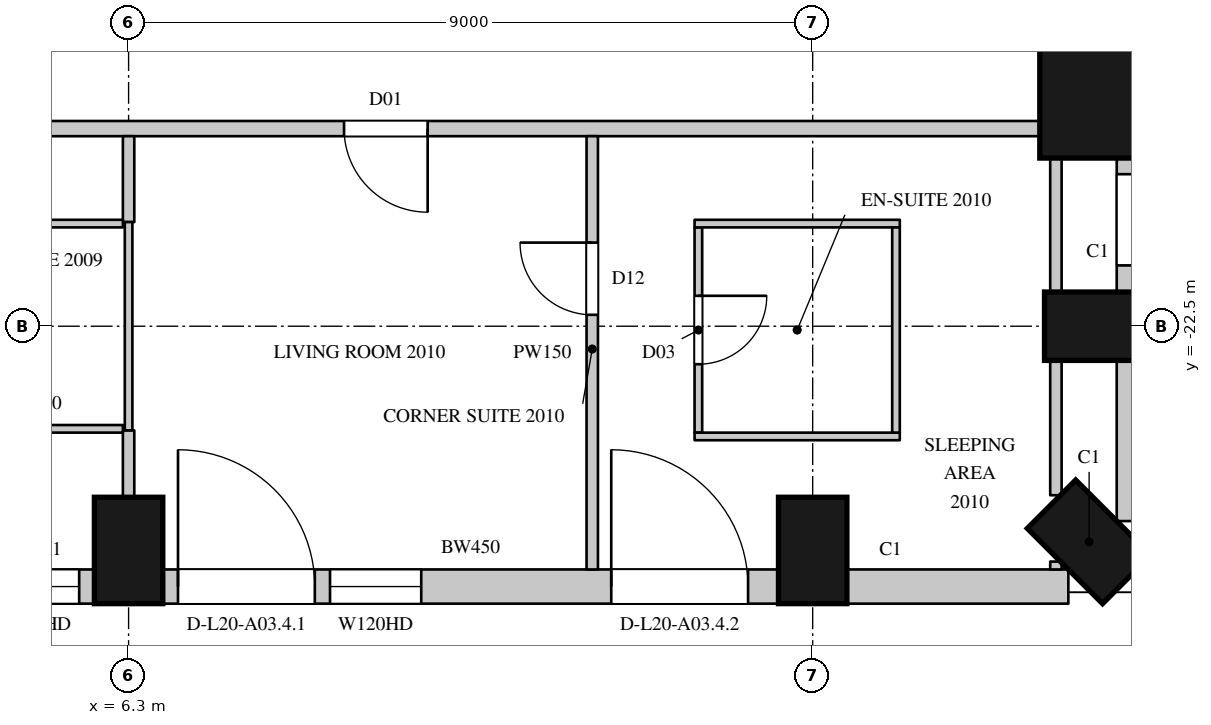
"""IFC4 building model, lengths in metres.
Left out: names, types, materials, properties, quantities, classifications, styles, units other than length and angle.
Written with IfcOpenShell. Run it as: python <this file> out.ifc"""

import sys

from ifc_helpers import new_model, si_unit, direction, frame, frame_2d, origin, origin_2d, place, context, subcontext, project, spatial, rectangle, circle, extrude, element, fill, save


model = new_model("IFC4")
c1 = context("Model", 3, precision=1e-05, world=origin(), true_north=direction((0.0, 1.0)))
c2 = subcontext(c1, "Body", "Model", "MODEL_VIEW")
j1 = project(units=[si_unit("LENGTHUNIT", "METRE"), si_unit("PLANEANGLEUNIT", "RADIAN")], contexts=[c1])
p1 = place(None, origin())
s1 = spatial("IfcSite", under=j1, at=p1, CompositionType="ELEMENT")
p2 = place(p1, origin())
s2 = spatial("IfcBuilding", under=s1, at=p2, CompositionType="ELEMENT")
p3 = place(p2, frame((0.0, 0.0, 102.3)))
s3 = spatial("IfcBuildingStorey", under=s2, at=p3, CompositionType="ELEMENT", Elevation=102.3)
for number, where, z_axis, x_axis in (
    (1, (6.3, -25.45, 0.0), (0.0, 0.0, 1.0), (1.0, 0.0, 0.0)),
    (2, (15.3, -25.45, 0.0), (0.0, 0.0, 1.0), (1.0, 0.0, 0.0)),
    (3, (18.937, -25.337, 0.0), (0.0, 0.0, 1.0), (0.707, 0.707, 0.0)),
    (4, (19.05, -22.5, 0.0), (0.0, 0.0, 1.0), (0.0, 1.0, 0.0)),
):
    element("IfcColumn", number, at=place(p3, frame(where, z_axis=z_axis, x_axis=x_axis)), inside=s3, PredefinedType="COLUMN", context=c2, shape_type="SweptSolid", body=[
        extrude(rectangle(XDim=0.9, YDim=1.4, at=origin_2d()), origin(), (0.0, 0.0, 1.0), 3.6),
    ])
p4 = place(p3, frame((19.088, -19.488, 0.0), z_axis=(0.0, 0.0, 1.0), x_axis=(1.0, 0.0, 0.0)))
e5 = element("IfcColumn", 5, at=p4, inside=s3, PredefinedType="COLUMN", context=c2, shape_type="SweptSolid", body=[
    extrude(circle(Radius=0.8, at=origin_2d()), origin(), (0.0, 0.0, 1.0), 3.6),
])
p5 = place(p3, frame((-2.25, -25.925, 0.0), z_axis=(0.0, 0.0, 1.0), x_axis=(1.0, 0.0, 0.0)))
e6 = element("IfcWall", 6, at=p5, inside=s3, PredefinedType="SOLIDWALL", context=c2, shape_type="SweptSolid", body=[
    extrude(rectangle(XDim=8.1, YDim=0.45, at=frame_2d((4.05, 0.0))), origin(), (0.0, 0.0, 1.0), 3.3),
])
p6 = place(p5, frame((0.2, 0.0, 0.0)))
e7 = element("IfcOpeningElement", 7, at=p6, cuts=e6, PredefinedType="OPENING", context=c2, shape_type="SweptSolid", body=[
    extrude(rectangle(XDim=1.8, YDim=2.4, at=frame_2d((0.9, 1.2))), frame((0.0, 0.235, 0.0), z_axis=(0.0, -1.0, 0.0), x_axis=(1.0, 0.0, 0.0)), (0.0, 0.0, 1.0), 0.47),
])
p7 = place(p5, frame((2.2, 0.0, 1.05)))
e8 = element("IfcOpeningElement", 8, at=p7, cuts=e6, PredefinedType="OPENING", context=c2, shape_type="SweptSolid", body=[
    extrude(rectangle(XDim=1.2, YDim=2.0, at=frame_2d((0.6, 1.0))), frame((0.0, 0.235, 0.0), z_axis=(0.0, -1.0, 0.0), x_axis=(1.0, 0.0, 0.0)), (0.0, 0.0, 1.0), 0.47),
])
p8 = place(p5, frame((4.7, 0.0, 0.0)))
e9 = element("IfcOpeningElement", 9, at=p8, cuts=e6, PredefinedType="OPENING", context=c2, shape_type="SweptSolid", body=[
    extrude(rectangle(XDim=1.8, YDim=2.4, at=frame_2d((0.9, 1.2))), frame((0.0, 0.235, 0.0), z_axis=(0.0, -1.0, 0.0), x_axis=(1.0, 0.0, 0.0)), (0.0, 0.0, 1.0), 0.47),
])
p9 = place(p5, frame((6.7, 0.0, 1.05)))
e10 = element("IfcOpeningElement", 10, at=p9, cuts=e6, PredefinedType="OPENING", context=c2, shape_type="SweptSolid", body=[
    extrude(rectangle(XDim=1.2, YDim=2.0, at=frame_2d((0.6, 1.0))), frame((0.0, 0.235, 0.0), z_axis=(0.0, -1.0, 0.0), x_axis=(1.0, 0.0, 0.0)), (0.0, 0.0, 1.0), 0.47),
])
p10 = place(p3, frame((6.75, -25.925, 0.0), z_axis=(0.0, 0.0, 1.0), x_axis=(1.0, 0.0, 0.0)))
e11 = element("IfcWall", 11, at=p10, inside=s3, PredefinedType="SOLIDWALL", context=c2, shape_type="SweptSolid", body=[
    extrude(rectangle(XDim=8.1, YDim=0.45, at=frame_2d((4.05, 0.0))), origin(), (0.0, 0.0, 1.0), 3.3),
])
p11 = place(p10, frame((0.2, 0.0, 0.0)))
e12 = element("IfcOpeningElement", 12, at=p11, cuts=e11, PredefinedType="OPENING", context=c2, shape_type="SweptSolid", body=[
    extrude(rectangle(XDim=1.8, YDim=2.4, at=frame_2d((0.9, 1.2))), frame((0.0, 0.235, 0.0), z_axis=(0.0, -1.0, 0.0), x_axis=(1.0, 0.0, 0.0)), (0.0, 0.0, 1.0), 0.47),
])
p12 = place(p10, frame((2.2, 0.0, 1.05)))
e13 = element("IfcOpeningElement", 13, at=p12, cuts=e11, PredefinedType="OPENING", context=c2, shape_type="SweptSolid", body=[
    extrude(rectangle(XDim=1.2, YDim=2.0, at=frame_2d((0.6, 1.0))), frame((0.0, 0.235, 0.0), z_axis=(0.0, -1.0, 0.0), x_axis=(1.0, 0.0, 0.0)), (0.0, 0.0, 1.0), 0.47),
])
p13 = place(p10, frame((5.9, 0.0, 0.0)))
e14 = element("IfcOpeningElement", 14, at=p13, cuts=e11, PredefinedType="OPENING", context=c2, shape_type="SweptSolid", body=[
    extrude(rectangle(XDim=1.8, YDim=2.4, at=frame_2d((0.9, 1.2))), frame((0.0, 0.235, 0.0), z_axis=(0.0, -1.0, 0.0), x_axis=(1.0, 0.0, 0.0)), (0.0, 0.0, 1.0), 0.47),
])
p14 = place(p3, frame((15.75, -25.925, 0.0), z_axis=(0.0, 0.0, 1.0), x_axis=(1.0, 0.0, 0.0)))
e15 = element("IfcWall", 15, at=p14, inside=s3, PredefinedType="SOLIDWALL", context=c2, shape_type="SweptSolid", body=[
    extrude(rectangle(XDim=2.914, YDim=0.45, at=frame_2d((1.457, 0.0))), origin(), (0.0, 0.0, 1.0), 3.3),
])
p15 = place(p3, frame((19.525, -25.064, 0.0), z_axis=(0.0, 0.0, 1.0), x_axis=(0.0, 1.0, 0.0)))
e16 = element("IfcWall", 16, at=p15, inside=s3, PredefinedType="SOLIDWALL", context=c2, shape_type="SweptSolid", body=[
    extrude(rectangle(XDim=2.114, YDim=0.45, at=frame_2d((1.057, 0.0))), origin(), (0.0, 0.0, 1.0), 3.3),
])
p16 = place(p3, frame((19.525, -22.05, 0.0), z_axis=(0.0, 0.0, 1.0), x_axis=(0.0, 1.0, 0.0)))
e17 = element("IfcWall", 17, at=p16, inside=s3, PredefinedType="SOLIDWALL", context=c2, shape_type="SweptSolid", body=[
    extrude(rectangle(XDim=1.792, YDim=0.45, at=frame_2d((0.896, 0.0))), origin(), (0.0, 0.0, 1.0), 3.3),
])
p17 = place(p16, frame((0.35, 0.0, 1.05)))
e18 = element("IfcOpeningElement", 18, at=p17, cuts=e17, PredefinedType="OPENING", context=c2, shape_type="SweptSolid", body=[
    extrude(rectangle(XDim=1.2, YDim=2.0, at=frame_2d((0.6, 1.0))), frame((0.0, 0.235, 0.0), z_axis=(0.0, -1.0, 0.0), x_axis=(1.0, 0.0, 0.0)), (0.0, 0.0, 1.0), 0.47),
])
p18 = place(p3, frame((-23.765, -19.9, 0.0), z_axis=(0.0, 0.0, 1.0), x_axis=(1.0, 0.0, 0.0)))
e19 = element("IfcWall", 19, at=p18, inside=s3, PredefinedType="PARTITIONING", context=c2, shape_type="SweptSolid", body=[
    extrude(rectangle(XDim=42.125, YDim=0.2, at=frame_2d((21.063, 0.0))), origin(), (0.0, 0.0, 1.0), 3.3),
])
p19 = place(p18, frame((6.2, 0.0, 0.0)))
e20 = element("IfcOpeningElement", 20, at=p19, cuts=e19, PredefinedType="OPENING", context=c2, shape_type="SweptSolid", body=[
    extrude(rectangle(XDim=0.95, YDim=2.2, at=frame_2d((0.475, 1.1))), frame((0.0, 0.11, 0.0), z_axis=(0.0, -1.0, 0.0), x_axis=(1.0, 0.0, 0.0)), (0.0, 0.0, 1.0), 0.22),
])
p20 = place(p18, frame((14.1, 0.0, 0.0)))
e21 = element("IfcOpeningElement", 21, at=p20, cuts=e19, PredefinedType="OPENING", context=c2, shape_type="SweptSolid", body=[
    extrude(rectangle(XDim=1.1, YDim=2.4, at=frame_2d((0.55, 1.2))), frame((0.0, 0.11, 0.0), z_axis=(0.0, -1.0, 0.0), x_axis=(1.0, 0.0, 0.0)), (0.0, 0.0, 1.0), 0.22),
])
p21 = place(p18, frame((24.2, 0.0, 0.0)))
e22 = element("IfcOpeningElement", 22, at=p21, cuts=e19, PredefinedType="OPENING", context=c2, shape_type="SweptSolid", body=[
    extrude(rectangle(XDim=0.95, YDim=2.2, at=frame_2d((0.475, 1.1))), frame((0.0, 0.11, 0.0), z_axis=(0.0, -1.0, 0.0), x_axis=(1.0, 0.0, 0.0)), (0.0, 0.0, 1.0), 0.22),
])
p22 = place(p18, frame((32.9, 0.0, 0.0)))
e23 = element("IfcOpeningElement", 23, at=p22, cuts=e19, PredefinedType="OPENING", context=c2, shape_type="SweptSolid", body=[
    extrude(rectangle(XDim=1.1, YDim=2.4, at=frame_2d((0.55, 1.2))), frame((0.0, 0.11, 0.0), z_axis=(0.0, -1.0, 0.0), x_axis=(1.0, 0.0, 0.0)), (0.0, 0.0, 1.0), 0.22),
])
p23 = place(p3, frame((6.3, -24.75, 0.0), z_axis=(0.0, 0.0, 1.0), x_axis=(0.0, 1.0, 0.0)))
e24 = element("IfcWall", 24, at=p23, inside=s3, PredefinedType="PARTITIONING", context=c2, shape_type="SweptSolid", body=[
    extrude(rectangle(XDim=0.88, YDim=0.15, at=frame_2d((0.44, 0.0))), origin(), (0.0, 0.0, 1.0), 2.75),
])
p24 = place(p3, frame((6.3, -21.13, 0.0), z_axis=(0.0, 0.0, 1.0), x_axis=(0.0, 1.0, 0.0)))
e25 = element("IfcWall", 25, at=p24, inside=s3, PredefinedType="PARTITIONING", context=c2, shape_type="SweptSolid", body=[
    extrude(rectangle(XDim=1.13, YDim=0.15, at=frame_2d((0.565, 0.0))), origin(), (0.0, 0.0, 1.0), 2.75),
])
p25 = place(p3, frame((12.4, -25.7, 0.0), z_axis=(0.0, 0.0, 1.0), x_axis=(0.0, 1.0, 0.0)))
e26 = element("IfcWall", 26, at=p25, inside=s3, PredefinedType="PARTITIONING", context=c2, shape_type="SweptSolid", body=[
    extrude(rectangle(XDim=5.7, YDim=0.15, at=frame_2d((2.85, 0.0))), origin(), (0.0, 0.0, 1.0), 3.3),
])
p26 = place(p25, frame((3.35, 0.0, 0.0)))
e27 = element("IfcOpeningElement", 27, at=p26, cuts=e26, PredefinedType="OPENING", context=c2, shape_type="SweptSolid", body=[
    extrude(rectangle(XDim=0.95, YDim=2.2, at=frame_2d((0.475, 1.1))), frame((0.0, 0.085, 0.0), z_axis=(0.0, -1.0, 0.0), x_axis=(1.0, 0.0, 0.0)), (0.0, 0.0, 1.0), 0.17),
])
p27 = place(p3, frame((18.5, -25.7, 0.0), z_axis=(0.0, 0.0, 1.0), x_axis=(0.0, 1.0, 0.0)))
e28 = element("IfcWall", 28, at=p27, inside=s3, PredefinedType="PARTITIONING", context=c2, shape_type="SweptSolid", body=[
    extrude(rectangle(XDim=0.104, YDim=0.15, at=frame_2d((0.052, 0.0))), origin(), (0.0, 0.0, 1.0), 3.3),
])
p28 = place(p3, frame((18.5, -24.724, 0.0), z_axis=(0.0, 0.0, 1.0), x_axis=(0.0, 1.0, 0.0)))
e29 = element("IfcWall", 29, at=p28, inside=s3, PredefinedType="PARTITIONING", context=c2, shape_type="SweptSolid", body=[
    extrude(rectangle(XDim=1.774, YDim=0.15, at=frame_2d((0.887, 0.0))), origin(), (0.0, 0.0, 1.0), 3.3),
])
p29 = place(p3, frame((18.5, -22.05, 0.0), z_axis=(0.0, 0.0, 1.0), x_axis=(0.0, 1.0, 0.0)))
e30 = element("IfcWall", 30, at=p29, inside=s3, PredefinedType="PARTITIONING", context=c2, shape_type="SweptSolid", body=[
    extrude(rectangle(XDim=1.964, YDim=0.15, at=frame_2d((0.982, 0.0))), origin(), (0.0, 0.0, 1.0), 3.3),
])
for number, where, z_axis, x_axis in (
    (31, (3.854, -23.85, 0.0), (0.0, 0.0, 1.0), (1.0, 0.0, 0.0)),
    (32, (3.854, -21.15, 0.0), (0.0, 0.0, 1.0), (1.0, 0.0, 0.0)),
):
    element("IfcWall", number, at=place(p3, frame(where, z_axis=z_axis, x_axis=x_axis)), inside=s3, PredefinedType="PARTITIONING", context=c2, shape_type="SweptSolid", body=[
        extrude(rectangle(XDim=2.371, YDim=0.1, at=frame_2d((1.186, 0.0))), origin(), (0.0, 0.0, 1.0), 3.3),
    ])
p30 = place(p3, frame((6.3, -23.87, 0.0), z_axis=(0.0, 0.0, 1.0), x_axis=(0.0, 1.0, 0.0)))
e33 = element("IfcWall", 33, at=p30, inside=s3, PredefinedType="PARTITIONING", context=c2, shape_type="SweptSolid", body=[
    extrude(rectangle(XDim=2.74, YDim=0.1, at=frame_2d((1.37, 0.0))), origin(), (0.0, 0.0, 1.0), 2.75),
])
p31 = place(p3, frame((13.796, -23.9, 0.0), z_axis=(0.0, 0.0, 1.0), x_axis=(0.0, 1.0, 0.0)))
e34 = element("IfcWall", 34, at=p31, inside=s3, PredefinedType="PARTITIONING", context=c2, shape_type="SweptSolid", body=[
    extrude(rectangle(XDim=2.7, YDim=0.1, at=frame_2d((1.35, 0.0))), origin(), (0.0, 0.0, 1.0), 3.3),
])
p32 = place(p31, frame((0.9, 0.0, 0.0)))
e35 = element("IfcOpeningElement", 35, at=p32, cuts=e34, PredefinedType="OPENING", context=c2, shape_type="SweptSolid", body=[
    extrude(rectangle(XDim=0.9, YDim=2.2, at=frame_2d((0.45, 1.1))), frame((0.0, 0.06, 0.0), z_axis=(0.0, -1.0, 0.0), x_axis=(1.0, 0.0, 0.0)), (0.0, 0.0, 1.0), 0.12),
])
for number, where, z_axis, x_axis in (
    (36, (13.746, -23.95, 0.0), (0.0, 0.0, 1.0), (1.0, 0.0, 0.0)),
    (37, (13.746, -21.15, 0.0), (0.0, 0.0, 1.0), (1.0, 0.0, 0.0)),
    (38, (16.396, -23.9, 0.0), (0.0, 0.0, 1.0), (0.0, 1.0, 0.0)),
):
    element("IfcWall", number, at=place(p3, frame(where, z_axis=z_axis, x_axis=x_axis)), inside=s3, PredefinedType="PARTITIONING", context=c2, shape_type="SweptSolid", body=[
        extrude(rectangle(XDim=2.7, YDim=0.1, at=frame_2d((1.35, 0.0))), origin(), (0.0, 0.0, 1.0), 3.3),
    ])
p33 = place(p9, origin())
e39 = element("IfcWindow", 39, at=p33, inside=s3, PartitioningType="SINGLE_PANEL", PredefinedType="WINDOW", context=c2, shape_type="SweptSolid", body=[
    extrude(rectangle(XDim=1.2, YDim=2.0, at=frame_2d((0.6, 1.0))), frame((0.0, 0.135, 0.0), z_axis=(0.0, -1.0, 0.0), x_axis=(1.0, 0.0, 0.0)), (0.0, 0.0, 1.0), 0.06),
])
fill(e10, e39)
p34 = place(p11, origin())
e40 = element("IfcDoor", 40, at=p34, inside=s3, OperationType="SLIDING_TO_LEFT", PredefinedType="DOOR", context=c2, shape_type="SweptSolid", body=[
    extrude(rectangle(XDim=1.8, YDim=2.4, at=frame_2d((0.9, 1.2))), frame((0.0, 0.13, 0.0), z_axis=(0.0, -1.0, 0.0), x_axis=(1.0, 0.0, 0.0)), (0.0, 0.0, 1.0), 0.05),
])
fill(e12, e40)
p35 = place(p12, origin())
e41 = element("IfcWindow", 41, at=p35, inside=s3, PartitioningType="SINGLE_PANEL", PredefinedType="WINDOW", context=c2, shape_type="SweptSolid", body=[
    extrude(rectangle(XDim=1.2, YDim=2.0, at=frame_2d((0.6, 1.0))), frame((0.0, 0.135, 0.0), z_axis=(0.0, -1.0, 0.0), x_axis=(1.0, 0.0, 0.0)), (0.0, 0.0, 1.0), 0.06),
])
fill(e13, e41)
p36 = place(p13, origin())
e42 = element("IfcDoor", 42, at=p36, inside=s3, OperationType="SLIDING_TO_LEFT", PredefinedType="DOOR", context=c2, shape_type="SweptSolid", body=[
    extrude(rectangle(XDim=1.8, YDim=2.4, at=frame_2d((0.9, 1.2))), frame((0.0, 0.13, 0.0), z_axis=(0.0, -1.0, 0.0), x_axis=(1.0, 0.0, 0.0)), (0.0, 0.0, 1.0), 0.05),
])
fill(e14, e42)
p37 = place(p17, origin())
e43 = element("IfcWindow", 43, at=p37, inside=s3, PartitioningType="SINGLE_PANEL", PredefinedType="WINDOW", context=c2, shape_type="SweptSolid", body=[
    extrude(rectangle(XDim=1.2, YDim=2.0, at=frame_2d((0.6, 1.0))), frame((0.0, 0.135, 0.0), z_axis=(0.0, -1.0, 0.0), x_axis=(1.0, 0.0, 0.0)), (0.0, 0.0, 1.0), 0.06),
])
fill(e18, e43)
p38 = place(p22, origin())
e44 = element("IfcDoor", 44, at=p38, inside=s3, OperationType="SINGLE_SWING_LEFT", PredefinedType="DOOR", context=c2, shape_type="SweptSolid", body=[
    extrude(rectangle(XDim=1.1, YDim=2.4, at=frame_2d((0.55, 1.2))), frame((0.0, 0.025, 0.0), z_axis=(0.0, -1.0, 0.0), x_axis=(1.0, 0.0, 0.0)), (0.0, 0.0, 1.0), 0.05),
])
fill(e23, e44)
p39 = place(p26, origin())
e45 = element("IfcDoor", 45, at=p39, inside=s3, OperationType="SINGLE_SWING_RIGHT", PredefinedType="DOOR", context=c2, shape_type="SweptSolid", body=[
    extrude(rectangle(XDim=0.95, YDim=2.2, at=frame_2d((0.475, 1.1))), frame((0.0, 0.025, 0.0), z_axis=(0.0, -1.0, 0.0), x_axis=(1.0, 0.0, 0.0)), (0.0, 0.0, 1.0), 0.05),
])
fill(e27, e45)
p40 = place(p32, origin())
e46 = element("IfcDoor", 46, at=p40, inside=s3, OperationType="SINGLE_SWING_LEFT", PredefinedType="DOOR", context=c2, shape_type="SweptSolid", body=[
    extrude(rectangle(XDim=0.9, YDim=2.2, at=frame_2d((0.45, 1.1))), frame((0.0, 0.025, 0.0), z_axis=(0.0, -1.0, 0.0), x_axis=(1.0, 0.0, 0.0)), (0.0, 0.0, 1.0), 0.05),
])
fill(e35, e46)
save(model, sys.argv[1])
